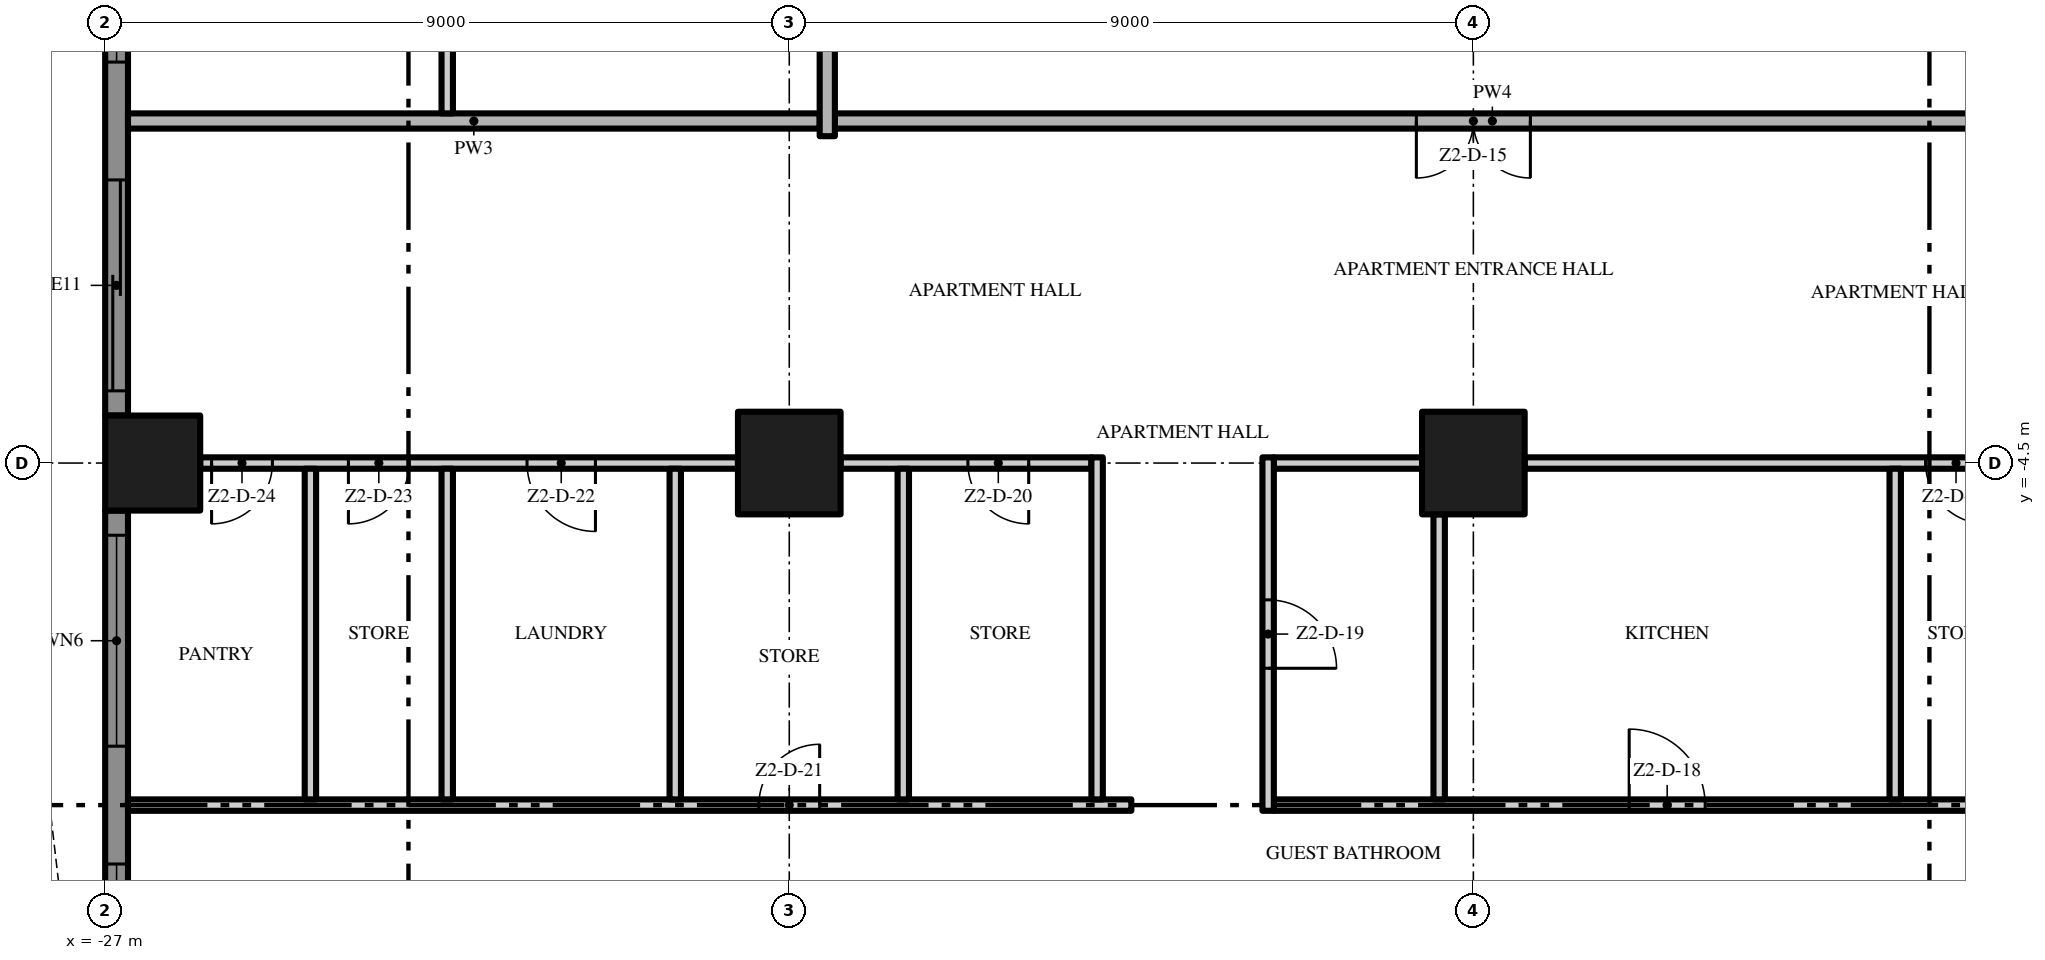
"""IFC4 building model, lengths in metres.
Left out: names, types, materials, properties, quantities, classifications, styles, units other than length and angle.
Written with IfcOpenShell. Run it as: python <this file> out.ifc"""

import sys

from ifc_helpers import new_model, si_unit, direction, frame, frame_2d, origin, origin_2d, place, context, subcontext, project, spatial, polyline, rectangle, outline, extrude, element, fill, save


model = new_model("IFC4")
c1 = context("Model", 3, precision=1e-05, world=origin(), true_north=direction((0.0, 1.0)))
c2 = subcontext(c1, "Body", "Model", "MODEL_VIEW")
j1 = project(units=[si_unit("LENGTHUNIT", "METRE"), si_unit("PLANEANGLEUNIT", "RADIAN")], contexts=[c1])
p1 = place(None, origin())
s1 = spatial("IfcSite", under=j1, at=p1, CompositionType="ELEMENT")
p2 = place(p1, origin())
s2 = spatial("IfcBuilding", under=s1, at=p2, CompositionType="ELEMENT")
p3 = place(p2, frame((0.0, 0.0, 103.6)))
s3 = spatial("IfcBuildingStorey", under=s2, at=p3, CompositionType="ELEMENT", Elevation=103.6)
p4 = place(p3, frame((-18.0, -4.5, 0.0), z_axis=(0.0, 0.0, 1.0), x_axis=(1.0, 0.0, 0.0)))
e1 = element("IfcColumn", 1, at=p4, inside=s3, PredefinedType="COLUMN", context=c2, shape_type="SweptSolid", body=[
    extrude(rectangle(XDim=1.35, YDim=1.35, at=origin_2d()), origin(), (0.0, 0.0, 1.0), 3.5),
])
p5 = place(p3, frame((-26.375, -4.5, 0.0), z_axis=(0.0, 0.0, 1.0), x_axis=(1.0, 0.0, 0.0)))
e2 = element("IfcColumn", 2, at=p5, inside=s3, PredefinedType="COLUMN", context=c2, shape_type="SweptSolid", body=[
    extrude(rectangle(XDim=1.25, YDim=1.25, at=origin_2d()), origin(), (0.0, 0.0, 1.0), 3.5),
])
p6 = place(p3, frame((-9.0, -4.5, 0.0), z_axis=(0.0, 0.0, 1.0), x_axis=(1.0, 0.0, 0.0)))
e3 = element("IfcColumn", 3, at=p6, inside=s3, PredefinedType="COLUMN", context=c2, shape_type="SweptSolid", body=[
    extrude(rectangle(XDim=1.35, YDim=1.35, at=origin_2d()), origin(), (0.0, 0.0, 1.0), 3.5),
])
p7 = place(p3, frame((-26.85, -3.875, 0.0), z_axis=(0.0, 0.0, 1.0), x_axis=(0.0, 1.0, 0.0)))
e4 = element("IfcWall", 4, at=p7, inside=s3, PredefinedType="SOLIDWALL", context=c2, shape_type="SweptSolid", body=[
    extrude(rectangle(XDim=7.75, YDim=0.3, at=frame_2d((3.875, 0.0))), origin(), (0.0, 0.0, 1.0), 3.5),
])
p8 = place(p7, frame((4.65, 0.0, 0.45)))
e5 = element("IfcOpeningElement", 5, at=p8, cuts=e4, PredefinedType="OPENING", context=c2, shape_type="SweptSolid", body=[
    extrude(rectangle(XDim=2.775, YDim=2.65, at=frame_2d((1.387, 1.325))), frame((0.0, 0.16, 0.0), z_axis=(0.0, -1.0, 0.0), x_axis=(1.0, 0.0, 0.0)), (0.0, 0.0, 1.0), 0.32),
])
p9 = place(p7, frame((0.325, 0.0, 0.0)))
e6 = element("IfcOpeningElement", 6, at=p9, cuts=e4, PredefinedType="OPENING", context=c2, shape_type="SweptSolid", body=[
    extrude(rectangle(XDim=2.775, YDim=2.4, at=frame_2d((1.387, 1.2))), frame((0.0, 0.16, 0.0), z_axis=(0.0, -1.0, 0.0), x_axis=(1.0, 0.0, 0.0)), (0.0, 0.0, 1.0), 0.32),
])
p10 = place(p3, frame((-26.85, -12.875, 0.0), z_axis=(0.0, 0.0, 1.0), x_axis=(0.0, 1.0, 0.0)))
e7 = element("IfcWall", 7, at=p10, inside=s3, PredefinedType="SOLIDWALL", context=c2, shape_type="SweptSolid", body=[
    extrude(rectangle(XDim=7.75, YDim=0.3, at=frame_2d((3.875, 0.0))), origin(), (0.0, 0.0, 1.0), 3.5),
])
p11 = place(p10, frame((4.65, 0.0, 0.45)))
e8 = element("IfcOpeningElement", 8, at=p11, cuts=e7, PredefinedType="OPENING", context=c2, shape_type="SweptSolid", body=[
    extrude(rectangle(XDim=2.775, YDim=2.65, at=frame_2d((1.387, 1.325))), frame((0.0, 0.16, 0.0), z_axis=(0.0, -1.0, 0.0), x_axis=(1.0, 0.0, 0.0)), (0.0, 0.0, 1.0), 0.32),
])
p12 = place(p10, frame((0.325, 0.0, 0.45)))
e9 = element("IfcOpeningElement", 9, at=p12, cuts=e7, PredefinedType="OPENING", context=c2, shape_type="SweptSolid", body=[
    extrude(rectangle(XDim=2.775, YDim=2.65, at=frame_2d((1.387, 1.325))), frame((0.0, 0.16, 0.0), z_axis=(0.0, -1.0, 0.0), x_axis=(1.0, 0.0, 0.0)), (0.0, 0.0, 1.0), 0.32),
])
p13 = place(p3, origin())
e10 = element("IfcWall", 10, at=p13, inside=s3, PredefinedType="USERDEFINED", context=c2, shape_type="SweptSolid", body=[
    extrude(outline(polyline([(-27.951, 18.0), (-28.612, 16.5), (-29.345, 15.0), (-29.869, 13.5), (-30.0, 12.375), (-29.985, 12.0), (-29.649, 10.5), (-28.988, 9.0), (-28.255, 7.5), (-27.731, 6.0), (-27.6, 4.875), (-27.615, 4.5), (-27.951, 3.0), (-28.612, 1.5), (-29.345, 0.0), (-29.869, -1.5), (-30.0, -2.625), (-29.985, -3.0), (-29.649, -4.5), (-28.988, -6.0), (-28.255, -7.5), (-27.731, -9.0), (-27.6, -10.125), (-27.615, -10.5), (-27.951, -12.0), (-28.612, -13.5), (-29.345, -15.0), (-29.869, -16.5), (-30.0, -17.625), (-29.985, -18.0), (-29.735, -17.99), (-29.749, -17.635), (-29.624, -16.556), (-29.114, -15.096), (-28.385, -13.605), (-27.713, -12.079), (-27.366, -10.533), (-27.349, -10.115), (-27.486, -8.944), (-28.024, -7.404), (-28.761, -5.895), (-29.41, -4.421), (-29.736, -2.967), (-29.749, -2.635), (-29.624, -1.556), (-29.114, -0.096), (-28.385, 1.395), (-27.713, 2.921), (-27.366, 4.467), (-27.349, 4.885), (-27.486, 6.056), (-28.024, 7.596), (-28.761, 9.105), (-29.41, 10.579), (-29.736, 12.033), (-29.749, 12.365), (-29.624, 13.444), (-29.114, 14.904), (-28.385, 16.395), (-27.723, 17.899), (-27.951, 18.0)])), origin(), (0.0, 0.0, 1.0), 0.9),
])
p14 = place(p3, frame((-26.7, -9.0, 0.0), z_axis=(0.0, 0.0, 1.0), x_axis=(1.0, 0.0, 0.0)))
e11 = element("IfcWall", 11, at=p14, inside=s3, PredefinedType="PARTITIONING", context=c2, shape_type="SweptSolid", body=[
    extrude(rectangle(XDim=13.2, YDim=0.15, at=frame_2d((6.6, 0.0))), origin(), (0.0, 0.0, 1.0), 3.5),
])
p15 = place(p14, frame((8.3, 0.0, 0.0)))
e12 = element("IfcOpeningElement", 12, at=p15, cuts=e11, PredefinedType="OPENING", context=c2, shape_type="SweptSolid", body=[
    extrude(rectangle(XDim=0.8, YDim=2.0, at=frame_2d((0.4, 1.0))), frame((0.0, 0.085, 0.0), z_axis=(0.0, -1.0, 0.0), x_axis=(1.0, 0.0, 0.0)), (0.0, 0.0, 1.0), 0.17),
])
p16 = place(p3, frame((-11.625, -9.0, 0.0), z_axis=(0.0, 0.0, 1.0), x_axis=(1.0, 0.0, 0.0)))
e13 = element("IfcWall", 13, at=p16, inside=s3, PredefinedType="PARTITIONING", context=c2, shape_type="SweptSolid", body=[
    extrude(rectangle(XDim=11.525, YDim=0.15, at=frame_2d((5.763, 0.0))), origin(), (0.0, 0.0, 1.0), 3.5),
])
p17 = place(p16, frame((10.325, 0.0, 0.0)))
e14 = element("IfcOpeningElement", 14, at=p17, cuts=e13, PredefinedType="OPENING", context=c2, shape_type="SweptSolid", body=[
    extrude(rectangle(XDim=0.8, YDim=2.0, at=frame_2d((0.4, 1.0))), frame((0.0, 0.085, 0.0), z_axis=(0.0, -1.0, 0.0), x_axis=(1.0, 0.0, 0.0)), (0.0, 0.0, 1.0), 0.17),
])
p18 = place(p16, frame((4.675, 0.0, 0.0)))
e15 = element("IfcOpeningElement", 15, at=p18, cuts=e13, PredefinedType="OPENING", context=c2, shape_type="SweptSolid", body=[
    extrude(rectangle(XDim=1.0, YDim=2.4, at=frame_2d((0.5, 1.2))), frame((0.0, 0.085, 0.0), z_axis=(0.0, -1.0, 0.0), x_axis=(1.0, 0.0, 0.0)), (0.0, 0.0, 1.0), 0.17),
])
p19 = place(p3, frame((-18.675, -4.5, 0.0), z_axis=(0.0, 0.0, 1.0), x_axis=(-1.0, 0.0, 0.0)))
e16 = element("IfcWall", 16, at=p19, inside=s3, PredefinedType="PARTITIONING", context=c2, shape_type="SweptSolid", body=[
    extrude(rectangle(XDim=7.075, YDim=0.15, at=frame_2d((3.538, 0.0))), origin(), (0.0, 0.0, 1.0), 3.5),
])
p20 = place(p19, frame((1.875, 0.0, 0.0)))
e17 = element("IfcOpeningElement", 17, at=p20, cuts=e16, PredefinedType="OPENING", context=c2, shape_type="SweptSolid", body=[
    extrude(rectangle(XDim=0.9, YDim=2.1, at=frame_2d((0.45, 1.05))), frame((0.0, 0.085, 0.0), z_axis=(0.0, -1.0, 0.0), x_axis=(1.0, 0.0, 0.0)), (0.0, 0.0, 1.0), 0.17),
])
p21 = place(p19, frame((4.325, 0.0, 0.0)))
e18 = element("IfcOpeningElement", 18, at=p21, cuts=e16, PredefinedType="OPENING", context=c2, shape_type="SweptSolid", body=[
    extrude(rectangle(XDim=0.8, YDim=2.0, at=frame_2d((0.4, 1.0))), frame((0.0, 0.085, 0.0), z_axis=(0.0, -1.0, 0.0), x_axis=(1.0, 0.0, 0.0)), (0.0, 0.0, 1.0), 0.17),
])
p22 = place(p19, frame((6.125, 0.0, 0.0)))
e19 = element("IfcOpeningElement", 19, at=p22, cuts=e16, PredefinedType="OPENING", context=c2, shape_type="SweptSolid", body=[
    extrude(rectangle(XDim=0.8, YDim=2.0, at=frame_2d((0.4, 1.0))), frame((0.0, 0.085, 0.0), z_axis=(0.0, -1.0, 0.0), x_axis=(1.0, 0.0, 0.0)), (0.0, 0.0, 1.0), 0.17),
])
p23 = place(p3, frame((-14.025, -4.5, 0.0), z_axis=(0.0, 0.0, 1.0), x_axis=(-1.0, 0.0, 0.0)))
e20 = element("IfcWall", 20, at=p23, inside=s3, PredefinedType="PARTITIONING", context=c2, shape_type="SweptSolid", body=[
    extrude(rectangle(XDim=3.3, YDim=0.15, at=frame_2d((1.65, 0.0))), origin(), (0.0, 0.0, 1.0), 3.5),
])
p24 = place(p23, frame((0.825, 0.0, 0.0)))
e21 = element("IfcOpeningElement", 21, at=p24, cuts=e20, PredefinedType="OPENING", context=c2, shape_type="SweptSolid", body=[
    extrude(rectangle(XDim=0.8, YDim=2.0, at=frame_2d((0.4, 1.0))), frame((0.0, 0.085, 0.0), z_axis=(0.0, -1.0, 0.0), x_axis=(1.0, 0.0, 0.0)), (0.0, 0.0, 1.0), 0.17),
])
p25 = place(p3, frame((-11.625, -4.5, 0.0), z_axis=(0.0, 0.0, 1.0), x_axis=(1.0, 0.0, 0.0)))
e22 = element("IfcWall", 22, at=p25, inside=s3, PredefinedType="PARTITIONING", context=c2, shape_type="SweptSolid", body=[
    extrude(rectangle(XDim=1.95, YDim=0.15, at=frame_2d((0.975, 0.0))), origin(), (0.0, 0.0, 1.0), 3.5),
])
p26 = place(p3, frame((-0.675, -4.5, 0.0), z_axis=(0.0, 0.0, 1.0), x_axis=(-1.0, 0.0, 0.0)))
e23 = element("IfcWall", 23, at=p26, inside=s3, PredefinedType="PARTITIONING", context=c2, shape_type="SweptSolid", body=[
    extrude(rectangle(XDim=7.65, YDim=0.15, at=frame_2d((3.825, 0.0))), origin(), (0.0, 0.0, 1.0), 3.5),
])
p27 = place(p26, frame((1.575, 0.0, 0.0)))
e24 = element("IfcOpeningElement", 24, at=p27, cuts=e23, PredefinedType="OPENING", context=c2, shape_type="SweptSolid", body=[
    extrude(rectangle(XDim=0.8, YDim=2.0, at=frame_2d((0.4, 1.0))), frame((0.0, 0.085, 0.0), z_axis=(0.0, -1.0, 0.0), x_axis=(1.0, 0.0, 0.0)), (0.0, 0.0, 1.0), 0.17),
])
p28 = place(p3, frame((-0.1, 0.0, 0.0), z_axis=(0.0, 0.0, 1.0), x_axis=(-1.0, 0.0, 0.0)))
e25 = element("IfcWall", 25, at=p28, inside=s3, PredefinedType="PARTITIONING", context=c2, shape_type="SweptSolid", body=[
    extrude(rectangle(XDim=17.3, YDim=0.2, at=frame_2d((8.65, 0.0))), origin(), (0.0, 0.0, 1.0), 3.5),
])
p29 = place(p28, frame((8.15, 0.0, 0.0)))
e26 = element("IfcOpeningElement", 26, at=p29, cuts=e25, PredefinedType="OPENING", context=c2, shape_type="SweptSolid", body=[
    extrude(rectangle(XDim=1.5, YDim=2.4, at=frame_2d((0.75, 1.2))), frame((0.0, 0.11, 0.0), z_axis=(0.0, -1.0, 0.0), x_axis=(1.0, 0.0, 0.0)), (0.0, 0.0, 1.0), 0.22),
])
p30 = place(p3, frame((-26.7, 0.0, 0.0), z_axis=(0.0, 0.0, 1.0), x_axis=(1.0, 0.0, 0.0)))
e27 = element("IfcWall", 27, at=p30, inside=s3, PredefinedType="PARTITIONING", context=c2, shape_type="SweptSolid", body=[
    extrude(rectangle(XDim=9.1, YDim=0.2, at=frame_2d((4.55, 0.0))), origin(), (0.0, 0.0, 1.0), 3.5),
])
for number, where, z_axis, x_axis in (
    (28, (-24.3, -8.925, 0.0), (0.0, 0.0, 1.0), (0.0, 1.0, 0.0)),
    (29, (-22.5, -8.925, 0.0), (0.0, 0.0, 1.0), (0.0, 1.0, 0.0)),
):
    element("IfcWall", number, at=place(p3, frame(where, z_axis=z_axis, x_axis=x_axis)), inside=s3, PredefinedType="PARTITIONING", context=c2, shape_type="SweptSolid", body=[
        extrude(rectangle(XDim=4.35, YDim=0.15, at=frame_2d((2.175, 0.0))), origin(), (0.0, 0.0, 1.0), 3.5),
    ])
p31 = place(p3, frame((-22.5, 0.1, 0.0), z_axis=(0.0, 0.0, 1.0), x_axis=(0.0, 1.0, 0.0)))
e30 = element("IfcWall", 30, at=p31, inside=s3, PredefinedType="PARTITIONING", context=c2, shape_type="SweptSolid", body=[
    extrude(rectangle(XDim=17.275, YDim=0.15, at=frame_2d((8.637, 0.0))), origin(), (0.0, 0.0, 1.0), 3.5),
])
p32 = place(p31, frame((1.65, 0.0, 0.0)))
e31 = element("IfcOpeningElement", 31, at=p32, cuts=e30, PredefinedType="OPENING", context=c2, shape_type="SweptSolid", body=[
    extrude(rectangle(XDim=1.0, YDim=2.4, at=frame_2d((0.5, 1.2))), frame((0.0, 0.085, 0.0), z_axis=(0.0, -1.0, 0.0), x_axis=(1.0, 0.0, 0.0)), (0.0, 0.0, 1.0), 0.17),
])
p33 = place(p31, frame((8.0, 0.0, 0.0)))
e32 = element("IfcOpeningElement", 32, at=p33, cuts=e30, PredefinedType="OPENING", context=c2, shape_type="SweptSolid", body=[
    extrude(rectangle(XDim=1.8, YDim=2.4, at=frame_2d((0.9, 1.2))), frame((0.0, 0.085, 0.0), z_axis=(0.0, -1.0, 0.0), x_axis=(1.0, 0.0, 0.0)), (0.0, 0.0, 1.0), 0.17),
])
p34 = place(p3, frame((-19.5, -8.925, 0.0), z_axis=(0.0, 0.0, 1.0), x_axis=(0.0, 1.0, 0.0)))
e33 = element("IfcWall", 33, at=p34, inside=s3, PredefinedType="PARTITIONING", context=c2, shape_type="SweptSolid", body=[
    extrude(rectangle(XDim=4.35, YDim=0.15, at=frame_2d((2.175, 0.0))), origin(), (0.0, 0.0, 1.0), 3.5),
])
p35 = place(p3, frame((-17.5, -0.2, 0.0), z_axis=(0.0, 0.0, 1.0), x_axis=(0.0, 1.0, 0.0)))
e34 = element("IfcWall", 34, at=p35, inside=s3, PredefinedType="PARTITIONING", context=c2, shape_type="SweptSolid", body=[
    extrude(rectangle(XDim=4.025, YDim=0.2, at=frame_2d((2.013, 0.0))), origin(), (0.0, 0.0, 1.0), 3.5),
])
p36 = place(p3, frame((-16.5, -8.925, 0.0), z_axis=(0.0, 0.0, 1.0), x_axis=(0.0, 1.0, 0.0)))
e35 = element("IfcWall", 35, at=p36, inside=s3, PredefinedType="PARTITIONING", context=c2, shape_type="SweptSolid", body=[
    extrude(rectangle(XDim=4.35, YDim=0.15, at=frame_2d((2.175, 0.0))), origin(), (0.0, 0.0, 1.0), 3.5),
])
p37 = place(p3, frame((-13.95, -8.925, 0.0), z_axis=(0.0, 0.0, 1.0), x_axis=(0.0, 1.0, 0.0)))
e36 = element("IfcWall", 36, at=p37, inside=s3, PredefinedType="PARTITIONING", context=c2, shape_type="SweptSolid", body=[
    extrude(rectangle(XDim=4.5, YDim=0.15, at=frame_2d((2.25, 0.0))), origin(), (0.0, 0.0, 1.0), 3.5),
])
p38 = place(p3, frame((-11.7, -4.425, 0.0), z_axis=(0.0, 0.0, 1.0), x_axis=(0.0, -1.0, 0.0)))
e37 = element("IfcWall", 37, at=p38, inside=s3, PredefinedType="PARTITIONING", context=c2, shape_type="SweptSolid", body=[
    extrude(rectangle(XDim=4.65, YDim=0.15, at=frame_2d((2.325, 0.0))), origin(), (0.0, 0.0, 1.0), 3.5),
])
p39 = place(p38, frame((1.875, 0.0, 0.0)))
e38 = element("IfcOpeningElement", 38, at=p39, cuts=e37, PredefinedType="OPENING", context=c2, shape_type="SweptSolid", body=[
    extrude(rectangle(XDim=0.9, YDim=2.1, at=frame_2d((0.45, 1.05))), frame((0.0, 0.085, 0.0), z_axis=(0.0, -1.0, 0.0), x_axis=(1.0, 0.0, 0.0)), (0.0, 0.0, 1.0), 0.17),
])
p40 = place(p3, frame((-9.45, -8.925, 0.0), z_axis=(0.0, 0.0, 1.0), x_axis=(0.0, 1.0, 0.0)))
e39 = element("IfcWall", 39, at=p40, inside=s3, PredefinedType="PARTITIONING", context=c2, shape_type="SweptSolid", body=[
    extrude(rectangle(XDim=3.75, YDim=0.15, at=frame_2d((1.875, 0.0))), origin(), (0.0, 0.0, 1.0), 3.5),
])
p41 = place(p3, frame((-3.45, -8.925, 0.0), z_axis=(0.0, 0.0, 1.0), x_axis=(0.0, 1.0, 0.0)))
e40 = element("IfcWall", 40, at=p41, inside=s3, PredefinedType="PARTITIONING", context=c2, shape_type="SweptSolid", body=[
    extrude(rectangle(XDim=4.35, YDim=0.15, at=frame_2d((2.175, 0.0))), origin(), (0.0, 0.0, 1.0), 3.5),
])
p42 = place(p8, origin())
e41 = element("IfcWindow", 41, at=p42, inside=s3, PartitioningType="SINGLE_PANEL", PredefinedType="WINDOW", context=c2, shape_type="SweptSolid", body=[
    extrude(rectangle(XDim=2.775, YDim=2.65, at=frame_2d((1.387, 1.325))), frame((0.0, 0.03, 0.0), z_axis=(0.0, -1.0, 0.0), x_axis=(1.0, 0.0, 0.0)), (0.0, 0.0, 1.0), 0.06),
])
fill(e5, e41)
p43 = place(p9, origin())
e42 = element("IfcDoor", 42, at=p43, inside=s3, OperationType="SINGLE_SWING_LEFT", PredefinedType="DOOR", context=c2, shape_type="SweptSolid", body=[
    extrude(rectangle(XDim=2.775, YDim=2.4, at=frame_2d((1.387, 1.2))), frame((0.0, 0.025, 0.0), z_axis=(0.0, -1.0, 0.0), x_axis=(1.0, 0.0, 0.0)), (0.0, 0.0, 1.0), 0.05),
])
fill(e6, e42)
p44 = place(p11, origin())
e43 = element("IfcWindow", 43, at=p44, inside=s3, PartitioningType="SINGLE_PANEL", PredefinedType="WINDOW", context=c2, shape_type="SweptSolid", body=[
    extrude(rectangle(XDim=2.775, YDim=2.65, at=frame_2d((1.387, 1.325))), frame((0.0, 0.03, 0.0), z_axis=(0.0, -1.0, 0.0), x_axis=(1.0, 0.0, 0.0)), (0.0, 0.0, 1.0), 0.06),
])
fill(e8, e43)
p45 = place(p12, origin())
e44 = element("IfcWindow", 44, at=p45, inside=s3, PartitioningType="SINGLE_PANEL", PredefinedType="WINDOW", context=c2, shape_type="SweptSolid", body=[
    extrude(rectangle(XDim=2.775, YDim=2.65, at=frame_2d((1.387, 1.325))), frame((0.0, 0.03, 0.0), z_axis=(0.0, -1.0, 0.0), x_axis=(1.0, 0.0, 0.0)), (0.0, 0.0, 1.0), 0.06),
])
fill(e9, e44)
p46 = place(p29, origin())
e45 = element("IfcDoor", 45, at=p46, inside=s3, OperationType="DOUBLE_DOOR_SINGLE_SWING", PredefinedType="DOOR", context=c2, shape_type="SweptSolid", body=[
    extrude(rectangle(XDim=1.5, YDim=2.4, at=frame_2d((0.75, 1.2))), frame((0.0, 0.025, 0.0), z_axis=(0.0, -1.0, 0.0), x_axis=(1.0, 0.0, 0.0)), (0.0, 0.0, 1.0), 0.05),
])
fill(e26, e45)
p47 = place(p27, origin())
e46 = element("IfcDoor", 46, at=p47, inside=s3, OperationType="SINGLE_SWING_LEFT", PredefinedType="DOOR", context=c2, shape_type="SweptSolid", body=[
    extrude(rectangle(XDim=0.8, YDim=2.0, at=frame_2d((0.4, 1.0))), frame((0.0, 0.025, 0.0), z_axis=(0.0, -1.0, 0.0), x_axis=(1.0, 0.0, 0.0)), (0.0, 0.0, 1.0), 0.05),
])
fill(e24, e46)
p48 = place(p18, origin())
e47 = element("IfcDoor", 47, at=p48, inside=s3, OperationType="SINGLE_SWING_LEFT", PredefinedType="DOOR", context=c2, shape_type="SweptSolid", body=[
    extrude(rectangle(XDim=1.0, YDim=2.4, at=frame_2d((0.5, 1.2))), frame((0.0, 0.025, 0.0), z_axis=(0.0, -1.0, 0.0), x_axis=(1.0, 0.0, 0.0)), (0.0, 0.0, 1.0), 0.05),
])
fill(e15, e47)
p49 = place(p39, origin())
e48 = element("IfcDoor", 48, at=p49, inside=s3, OperationType="SINGLE_SWING_RIGHT", PredefinedType="DOOR", context=c2, shape_type="SweptSolid", body=[
    extrude(rectangle(XDim=0.9, YDim=2.1, at=frame_2d((0.45, 1.05))), frame((0.0, 0.025, 0.0), z_axis=(0.0, -1.0, 0.0), x_axis=(1.0, 0.0, 0.0)), (0.0, 0.0, 1.0), 0.05),
])
fill(e38, e48)
p50 = place(p24, origin())
e49 = element("IfcDoor", 49, at=p50, inside=s3, OperationType="SINGLE_SWING_LEFT", PredefinedType="DOOR", context=c2, shape_type="SweptSolid", body=[
    extrude(rectangle(XDim=0.8, YDim=2.0, at=frame_2d((0.4, 1.0))), frame((0.0, 0.025, 0.0), z_axis=(0.0, -1.0, 0.0), x_axis=(1.0, 0.0, 0.0)), (0.0, 0.0, 1.0), 0.05),
])
fill(e21, e49)
p51 = place(p15, origin())
e50 = element("IfcDoor", 50, at=p51, inside=s3, OperationType="SINGLE_SWING_RIGHT", PredefinedType="DOOR", context=c2, shape_type="SweptSolid", body=[
    extrude(rectangle(XDim=0.8, YDim=2.0, at=frame_2d((0.4, 1.0))), frame((0.0, 0.025, 0.0), z_axis=(0.0, -1.0, 0.0), x_axis=(1.0, 0.0, 0.0)), (0.0, 0.0, 1.0), 0.05),
])
fill(e12, e50)
p52 = place(p20, origin())
e51 = element("IfcDoor", 51, at=p52, inside=s3, OperationType="SINGLE_SWING_LEFT", PredefinedType="DOOR", context=c2, shape_type="SweptSolid", body=[
    extrude(rectangle(XDim=0.9, YDim=2.1, at=frame_2d((0.45, 1.05))), frame((0.0, 0.025, 0.0), z_axis=(0.0, -1.0, 0.0), x_axis=(1.0, 0.0, 0.0)), (0.0, 0.0, 1.0), 0.05),
])
fill(e17, e51)
p53 = place(p21, origin())
e52 = element("IfcDoor", 52, at=p53, inside=s3, OperationType="SINGLE_SWING_RIGHT", PredefinedType="DOOR", context=c2, shape_type="SweptSolid", body=[
    extrude(rectangle(XDim=0.8, YDim=2.0, at=frame_2d((0.4, 1.0))), frame((0.0, 0.025, 0.0), z_axis=(0.0, -1.0, 0.0), x_axis=(1.0, 0.0, 0.0)), (0.0, 0.0, 1.0), 0.05),
])
fill(e18, e52)
p54 = place(p22, origin())
e53 = element("IfcDoor", 53, at=p54, inside=s3, OperationType="SINGLE_SWING_RIGHT", PredefinedType="DOOR", context=c2, shape_type="SweptSolid", body=[
    extrude(rectangle(XDim=0.8, YDim=2.0, at=frame_2d((0.4, 1.0))), frame((0.0, 0.025, 0.0), z_axis=(0.0, -1.0, 0.0), x_axis=(1.0, 0.0, 0.0)), (0.0, 0.0, 1.0), 0.05),
])
fill(e19, e53)
save(model, sys.argv[1])
